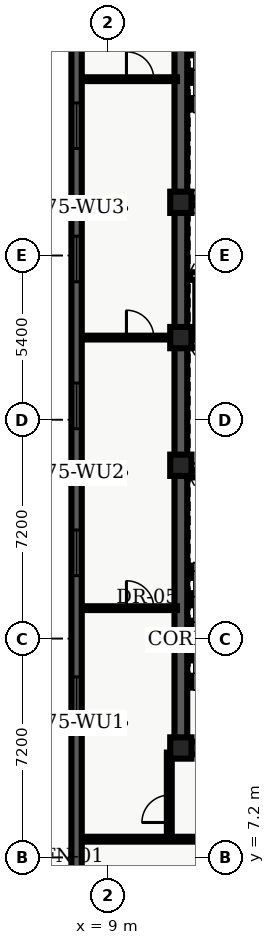
"""IFC4 building model, lengths in metres.
Left out: names, types, materials, properties, quantities, classifications, styles, units other than length and angle.
Written with IfcOpenShell. Run it as: python <this file> out.ifc"""

import sys

from ifc_helpers import new_model, entity, si_unit, converted_unit, direction, frame, origin_with_axes, origin_2d_with_axis, place, context, subcontext, project, spatial, polyline, rectangle, outline, extrude, element, fill, save


model = new_model("IFC4")
c1 = context("Model", 3, precision=1e-05, world=origin_with_axes(), true_north=direction((0.0, 1.0)))
c2 = subcontext(c1, "Body", "Model", "MODEL_VIEW")
j1 = project(units=[si_unit("LENGTHUNIT", "METRE"), converted_unit("PLANEANGLEUNIT", "DEGREE", entity("IfcPlaneAngleMeasure", 0.017), si_unit("PLANEANGLEUNIT", "RADIAN"), dimensions=[0, 0, 0, 0, 0, 0, 0])], contexts=[c1])
p1 = place(None, origin_with_axes())
s1 = spatial("IfcSite", under=j1, at=p1, CompositionType="ELEMENT")
p2 = place(p1, origin_with_axes())
s2 = spatial("IfcBuilding", under=s1, at=p2, CompositionType="ELEMENT")
p3 = place(p2, frame((0.0, 0.0, 303.6), z_axis=(0.0, 0.0, 1.0), x_axis=(1.0, 0.0, 0.0)))
s3 = spatial("IfcBuildingStorey", under=s2, at=p3, CompositionType="ELEMENT", Elevation=303.6)
p4 = place(p3, frame((11.4, 10.8, 0.0), z_axis=(0.0, 0.0, 1.0), x_axis=(0.0, 1.0, 0.0)))
e1 = element("IfcWall", 1, at=p4, inside=s3, PredefinedType="SHEAR", context=c2, shape_type="SweptSolid", body=[
    extrude(outline(polyline([(0.0, -0.21), (27.0, -0.21), (27.0, 0.21), (0.0, 0.21), (0.0, -0.21)])), origin_with_axes(), (0.0, 0.0, 1.0), 4.84),
])
p5 = place(p3, frame((11.4, 10.8, 0.0), z_axis=(0.0, 0.0, 1.0), x_axis=(1.0, 0.0, 0.0)))
e2 = element("IfcWall", 2, at=p5, inside=s3, PredefinedType="SHEAR", context=c2, shape_type="SweptSolid", body=[
    extrude(outline(polyline([(0.0, -0.21), (7.2, -0.21), (7.2, 0.21), (0.0, 0.21), (0.0, -0.21)])), origin_with_axes(), (0.0, 0.0, 1.0), 4.84),
])
p6 = place(p5, frame((2.625, 0.0, 0.0), z_axis=(0.0, 0.0, 1.0), x_axis=(1.0, 0.0, 0.0)))
e3 = element("IfcOpeningElement", 3, at=p6, cuts=e2, PredefinedType="OPENING", context=c2, shape_type="SweptSolid", body=[
    extrude(rectangle(XDim=1.05, YDim=0.44, at=origin_2d_with_axis()), origin_with_axes(), (0.0, 0.0, 1.0), 2.15),
])
for number, where, z_axis, x_axis in (
    (4, (11.61, 19.825, 0.0), (0.0, 0.0, 1.0), (1.0, 0.0, 0.0)),
    (5, (11.61, 28.775, 0.0), (0.0, 0.0, 1.0), (1.0, 0.0, 0.0)),
):
    element("IfcWall", number, at=place(p3, frame(where, z_axis=z_axis, x_axis=x_axis)), inside=s3, PredefinedType="SHEAR", context=c2, shape_type="SweptSolid", body=[
        extrude(outline(polyline([(0.0, -0.125), (6.78, -0.125), (6.78, 0.125), (0.0, 0.125), (0.0, -0.125)])), origin_with_axes(), (0.0, 0.0, 1.0), 4.84),
    ])
p7 = place(p3, frame((11.7, 24.1, 0.0), z_axis=(0.0, 0.0, 1.0), x_axis=(1.0, 0.0, 0.0)))
e6 = element("IfcWall", 6, at=p7, inside=s3, PredefinedType="SOLIDWALL", context=c2, shape_type="SweptSolid", body=[
    extrude(outline(polyline([(0.0, -0.125), (6.6, -0.125), (6.6, 0.125), (0.0, 0.125), (0.0, -0.125)])), origin_with_axes(), (0.0, 0.0, 1.0), 3.6),
])
p8 = place(p7, frame((3.6, 0.0, 0.0), z_axis=(0.0, 0.0, 1.0), x_axis=(1.0, 0.0, 0.0)))
e7 = element("IfcOpeningElement", 7, at=p8, cuts=e6, PredefinedType="OPENING", context=c2, shape_type="SweptSolid", body=[
    extrude(rectangle(XDim=0.9, YDim=0.27, at=origin_2d_with_axis()), origin_with_axes(), (0.0, 0.0, 1.0), 2.15),
])
p9 = place(p7, frame((5.65, 0.0, 0.0), z_axis=(0.0, 0.0, 1.0), x_axis=(1.0, 0.0, 0.0)))
e8 = element("IfcOpeningElement", 8, at=p9, cuts=e6, PredefinedType="OPENING", context=c2, shape_type="SweptSolid", body=[
    extrude(rectangle(XDim=0.9, YDim=0.27, at=origin_2d_with_axis()), origin_with_axes(), (0.0, 0.0, 1.0), 2.15),
])
p10 = place(p3, frame((11.7, 26.325, 0.0), z_axis=(0.0, 0.0, 1.0), x_axis=(1.0, 0.0, 0.0)))
e9 = element("IfcWall", 9, at=p10, inside=s3, PredefinedType="SOLIDWALL", context=c2, shape_type="SweptSolid", body=[
    extrude(outline(polyline([(0.0, -0.125), (6.6, -0.125), (6.6, 0.125), (0.0, 0.125), (0.0, -0.125)])), origin_with_axes(), (0.0, 0.0, 1.0), 3.6),
])
p11 = place(p10, frame((3.5, 0.0, 0.0), z_axis=(0.0, 0.0, 1.0), x_axis=(1.0, 0.0, 0.0)))
e10 = element("IfcOpeningElement", 10, at=p11, cuts=e9, PredefinedType="OPENING", context=c2, shape_type="SweptSolid", body=[
    extrude(rectangle(XDim=0.9, YDim=0.27, at=origin_2d_with_axis()), origin_with_axes(), (0.0, 0.0, 1.0), 2.15),
])
for number, where, z_axis, x_axis in (
    (11, (11.4, 10.8, 0.0), (0.0, 0.0, 1.0), (1.0, 0.0, 0.0)),
    (12, (11.4, 20.1, 0.0), (0.0, 0.0, 1.0), (1.0, 0.0, 0.0)),
    (13, (11.4, 24.3, 0.0), (0.0, 0.0, 1.0), (1.0, 0.0, 0.0)),
    (14, (11.4, 28.75, 0.0), (0.0, 0.0, 1.0), (1.0, 0.0, 0.0)),
):
    element("IfcColumn", number, at=place(p3, frame(where, z_axis=z_axis, x_axis=x_axis)), inside=s3, PredefinedType="COLUMN", context=c2, shape_type="SweptSolid", body=[
        extrude(rectangle(XDim=0.7, YDim=0.7, at=origin_2d_with_axis()), origin_with_axes(), (0.0, 0.0, 1.0), 5.1),
    ])
p12 = place(p3, frame((8.135, 7.8, 0.0), z_axis=(0.0, 0.0, 1.0), x_axis=(1.0, 0.0, 0.0)))
e15 = element("IfcWall", 15, at=p12, inside=s3, PredefinedType="PARTITIONING", context=c2, shape_type="SweptSolid", body=[
    extrude(outline(polyline([(0.0, -0.08), (12.165, -0.08), (12.165, 0.08), (0.0, 0.08), (0.0, -0.08)])), origin_with_axes(), (0.0, 0.0, 1.0), 3.2),
])
p13 = place(p12, frame((6.065, 0.0, 0.0), z_axis=(0.0, 0.0, 1.0), x_axis=(1.0, 0.0, 0.0)))
e16 = element("IfcOpeningElement", 16, at=p13, cuts=e15, PredefinedType="OPENING", context=c2, shape_type="SweptSolid", body=[
    extrude(rectangle(XDim=1.0, YDim=0.18, at=origin_2d_with_axis()), origin_with_axes(), (0.0, 0.0, 1.0), 2.15),
])
p14 = place(p3, frame((11.02, 7.8, 0.0), z_axis=(0.0, 0.0, 1.0), x_axis=(0.0, 1.0, 0.0)))
e17 = element("IfcWall", 17, at=p14, inside=s3, PredefinedType="PARTITIONING", context=c2, shape_type="SweptSolid", body=[
    extrude(outline(polyline([(0.0, -0.08), (2.85, -0.08), (2.85, 0.08), (0.0, 0.08), (0.0, -0.08)])), origin_with_axes(), (0.0, 0.0, 1.0), 3.2),
])
p15 = place(p14, frame((1.0, 0.0, 0.0), z_axis=(0.0, 0.0, 1.0), x_axis=(1.0, 0.0, 0.0)))
e18 = element("IfcOpeningElement", 18, at=p15, cuts=e17, PredefinedType="OPENING", context=c2, shape_type="SweptSolid", body=[
    extrude(rectangle(XDim=0.9, YDim=0.18, at=origin_2d_with_axis()), origin_with_axes(), (0.0, 0.0, 1.0), 2.15),
])
p16 = place(p3, frame((8.135, 15.4, 0.0), z_axis=(0.0, 0.0, 1.0), x_axis=(1.0, 0.0, 0.0)))
e19 = element("IfcWall", 19, at=p16, inside=s3, PredefinedType="PARTITIONING", context=c2, shape_type="SweptSolid", body=[
    extrude(outline(polyline([(0.0, -0.062), (3.135, -0.062), (3.135, 0.062), (0.0, 0.062), (0.0, -0.062)])), origin_with_axes(), (0.0, 0.0, 1.0), 3.2),
])
p17 = place(p16, frame((1.925, 0.0, 0.0), z_axis=(0.0, 0.0, 1.0), x_axis=(1.0, 0.0, 0.0)))
e20 = element("IfcOpeningElement", 20, at=p17, cuts=e19, PredefinedType="OPENING", context=c2, shape_type="SweptSolid", body=[
    extrude(rectangle(XDim=0.9, YDim=0.145, at=origin_2d_with_axis()), origin_with_axes(), (0.0, 0.0, 1.0), 2.15),
])
p18 = place(p3, frame((8.135, 24.3, 0.0), z_axis=(0.0, 0.0, 1.0), x_axis=(1.0, 0.0, 0.0)))
e21 = element("IfcWall", 21, at=p18, inside=s3, PredefinedType="PARTITIONING", context=c2, shape_type="SweptSolid", body=[
    extrude(outline(polyline([(0.0, -0.062), (3.135, -0.062), (3.135, 0.062), (0.0, 0.062), (0.0, -0.062)])), origin_with_axes(), (0.0, 0.0, 1.0), 3.2),
])
p19 = place(p18, frame((1.925, 0.0, 0.0), z_axis=(0.0, 0.0, 1.0), x_axis=(1.0, 0.0, 0.0)))
e22 = element("IfcOpeningElement", 22, at=p19, cuts=e21, PredefinedType="OPENING", context=c2, shape_type="SweptSolid", body=[
    extrude(rectangle(XDim=0.9, YDim=0.145, at=origin_2d_with_axis()), origin_with_axes(), (0.0, 0.0, 1.0), 2.15),
])
p20 = place(p3, frame((8.135, 32.8, 0.0), z_axis=(0.0, 0.0, 1.0), x_axis=(1.0, 0.0, 0.0)))
e23 = element("IfcWall", 23, at=p20, inside=s3, PredefinedType="PARTITIONING", context=c2, shape_type="SweptSolid", body=[
    extrude(outline(polyline([(0.0, -0.062), (3.135, -0.062), (3.135, 0.062), (0.0, 0.062), (0.0, -0.062)])), origin_with_axes(), (0.0, 0.0, 1.0), 3.2),
])
p21 = place(p20, frame((1.925, 0.0, 0.0), z_axis=(0.0, 0.0, 1.0), x_axis=(1.0, 0.0, 0.0)))
e24 = element("IfcOpeningElement", 24, at=p21, cuts=e23, PredefinedType="OPENING", context=c2, shape_type="SweptSolid", body=[
    extrude(rectangle(XDim=0.9, YDim=0.145, at=origin_2d_with_axis()), origin_with_axes(), (0.0, 0.0, 1.0), 2.15),
])
p22 = place(p3, frame((7.97, 4.54, 0.0), z_axis=(0.0, 0.0, 1.0), x_axis=(0.0, 1.0, 0.0)))
e25 = element("IfcWall", 25, at=p22, inside=s3, PredefinedType="SOLIDWALL", context=c2, shape_type="SweptSolid", body=[
    extrude(outline(polyline([(0.0, -0.17), (39.86, -0.17), (39.86, 0.17), (0.0, 0.17), (0.0, -0.17)])), origin_with_axes(), (0.0, 0.0, 1.0), 4.84),
])
p23 = place(p22, frame((7.849, 0.0, 0.45), z_axis=(0.0, 0.0, 1.0), x_axis=(1.0, 0.0, 0.0)))
e26 = element("IfcOpeningElement", 26, at=p23, cuts=e25, PredefinedType="OPENING", context=c2, shape_type="SweptSolid", body=[
    extrude(rectangle(XDim=1.5, YDim=0.36, at=origin_2d_with_axis()), origin_with_axes(), (0.0, 0.0, 1.0), 2.1),
])
p24 = place(p22, frame((12.681, 0.0, 0.45), z_axis=(0.0, 0.0, 1.0), x_axis=(1.0, 0.0, 0.0)))
e27 = element("IfcOpeningElement", 27, at=p24, cuts=e25, PredefinedType="OPENING", context=c2, shape_type="SweptSolid", body=[
    extrude(rectangle(XDim=1.5, YDim=0.36, at=origin_2d_with_axis()), origin_with_axes(), (0.0, 0.0, 1.0), 2.1),
])
p25 = place(p22, frame((17.514, 0.0, 0.45), z_axis=(0.0, 0.0, 1.0), x_axis=(1.0, 0.0, 0.0)))
e28 = element("IfcOpeningElement", 28, at=p25, cuts=e25, PredefinedType="OPENING", context=c2, shape_type="SweptSolid", body=[
    extrude(rectangle(XDim=1.5, YDim=0.36, at=origin_2d_with_axis()), origin_with_axes(), (0.0, 0.0, 1.0), 2.1),
])
p26 = place(p22, frame((22.346, 0.0, 0.45), z_axis=(0.0, 0.0, 1.0), x_axis=(1.0, 0.0, 0.0)))
e29 = element("IfcOpeningElement", 29, at=p26, cuts=e25, PredefinedType="OPENING", context=c2, shape_type="SweptSolid", body=[
    extrude(rectangle(XDim=1.5, YDim=0.36, at=origin_2d_with_axis()), origin_with_axes(), (0.0, 0.0, 1.0), 2.1),
])
p27 = place(p22, frame((26.729, 0.0, 0.45), z_axis=(0.0, 0.0, 1.0), x_axis=(1.0, 0.0, 0.0)))
e30 = element("IfcOpeningElement", 30, at=p27, cuts=e25, PredefinedType="OPENING", context=c2, shape_type="SweptSolid", body=[
    extrude(rectangle(XDim=1.5, YDim=0.36, at=origin_2d_with_axis()), origin_with_axes(), (0.0, 0.0, 1.0), 2.1),
])
p28 = place(p22, frame((32.011, 0.0, 0.45), z_axis=(0.0, 0.0, 1.0), x_axis=(1.0, 0.0, 0.0)))
e31 = element("IfcOpeningElement", 31, at=p28, cuts=e25, PredefinedType="OPENING", context=c2, shape_type="SweptSolid", body=[
    extrude(rectangle(XDim=1.5, YDim=0.36, at=origin_2d_with_axis()), origin_with_axes(), (0.0, 0.0, 1.0), 2.1),
])
p29 = place(p22, frame((37.294, 0.0, 0.45), z_axis=(0.0, 0.0, 1.0), x_axis=(1.0, 0.0, 0.0)))
e32 = element("IfcOpeningElement", 32, at=p29, cuts=e25, PredefinedType="OPENING", context=c2, shape_type="SweptSolid", body=[
    extrude(rectangle(XDim=1.5, YDim=0.36, at=origin_2d_with_axis()), origin_with_axes(), (0.0, 0.0, 1.0), 2.1),
])
p30 = place(p16, frame((1.925, 0.0, 0.0), z_axis=(0.0, 0.0, 1.0), x_axis=(1.0, 0.0, 0.0)))
e33 = element("IfcDoor", 33, at=p30, inside=s3, OperationType="SINGLE_SWING_LEFT", PredefinedType="DOOR", context=c2, shape_type="SweptSolid", body=[
    extrude(rectangle(XDim=0.9, YDim=0.075, at=origin_2d_with_axis()), origin_with_axes(), (0.0, 0.0, 1.0), 2.15),
])
fill(e20, e33)
p31 = place(p18, frame((1.925, 0.0, 0.0), z_axis=(0.0, 0.0, 1.0), x_axis=(1.0, 0.0, 0.0)))
e34 = element("IfcDoor", 34, at=p31, inside=s3, OperationType="SINGLE_SWING_LEFT", PredefinedType="DOOR", context=c2, shape_type="SweptSolid", body=[
    extrude(rectangle(XDim=0.9, YDim=0.075, at=origin_2d_with_axis()), origin_with_axes(), (0.0, 0.0, 1.0), 2.15),
])
fill(e22, e34)
p32 = place(p20, frame((1.925, 0.0, 0.0), z_axis=(0.0, 0.0, 1.0), x_axis=(1.0, 0.0, 0.0)))
e35 = element("IfcDoor", 35, at=p32, inside=s3, OperationType="SINGLE_SWING_LEFT", PredefinedType="DOOR", context=c2, shape_type="SweptSolid", body=[
    extrude(rectangle(XDim=0.9, YDim=0.075, at=origin_2d_with_axis()), origin_with_axes(), (0.0, 0.0, 1.0), 2.15),
])
fill(e24, e35)
p33 = place(p14, frame((1.0, 0.0, 0.0), z_axis=(0.0, 0.0, 1.0), x_axis=(1.0, 0.0, 0.0)))
e36 = element("IfcDoor", 36, at=p33, inside=s3, OperationType="SINGLE_SWING_LEFT", PredefinedType="DOOR", context=c2, shape_type="SweptSolid", body=[
    extrude(rectangle(XDim=0.9, YDim=0.09, at=origin_2d_with_axis()), origin_with_axes(), (0.0, 0.0, 1.0), 2.15),
])
fill(e18, e36)
p34 = place(p22, frame((7.849, 0.0, 0.45), z_axis=(0.0, 0.0, 1.0), x_axis=(1.0, 0.0, 0.0)))
e37 = element("IfcWindow", 37, at=p34, inside=s3, PredefinedType="WINDOW", context=c2, shape_type="SweptSolid", body=[
    extrude(rectangle(XDim=1.5, YDim=0.09, at=origin_2d_with_axis()), origin_with_axes(), (0.0, 0.0, 1.0), 2.1),
])
fill(e26, e37)
p35 = place(p22, frame((12.681, 0.0, 0.45), z_axis=(0.0, 0.0, 1.0), x_axis=(1.0, 0.0, 0.0)))
e38 = element("IfcWindow", 38, at=p35, inside=s3, PredefinedType="WINDOW", context=c2, shape_type="SweptSolid", body=[
    extrude(rectangle(XDim=1.5, YDim=0.09, at=origin_2d_with_axis()), origin_with_axes(), (0.0, 0.0, 1.0), 2.1),
])
fill(e27, e38)
p36 = place(p22, frame((17.514, 0.0, 0.45), z_axis=(0.0, 0.0, 1.0), x_axis=(1.0, 0.0, 0.0)))
e39 = element("IfcWindow", 39, at=p36, inside=s3, PredefinedType="WINDOW", context=c2, shape_type="SweptSolid", body=[
    extrude(rectangle(XDim=1.5, YDim=0.09, at=origin_2d_with_axis()), origin_with_axes(), (0.0, 0.0, 1.0), 2.1),
])
fill(e28, e39)
p37 = place(p22, frame((22.346, 0.0, 0.45), z_axis=(0.0, 0.0, 1.0), x_axis=(1.0, 0.0, 0.0)))
e40 = element("IfcWindow", 40, at=p37, inside=s3, PredefinedType="WINDOW", context=c2, shape_type="SweptSolid", body=[
    extrude(rectangle(XDim=1.5, YDim=0.09, at=origin_2d_with_axis()), origin_with_axes(), (0.0, 0.0, 1.0), 2.1),
])
fill(e29, e40)
p38 = place(p22, frame((26.729, 0.0, 0.45), z_axis=(0.0, 0.0, 1.0), x_axis=(1.0, 0.0, 0.0)))
e41 = element("IfcWindow", 41, at=p38, inside=s3, PredefinedType="WINDOW", context=c2, shape_type="SweptSolid", body=[
    extrude(rectangle(XDim=1.5, YDim=0.09, at=origin_2d_with_axis()), origin_with_axes(), (0.0, 0.0, 1.0), 2.1),
])
fill(e30, e41)
save(model, sys.argv[1])
